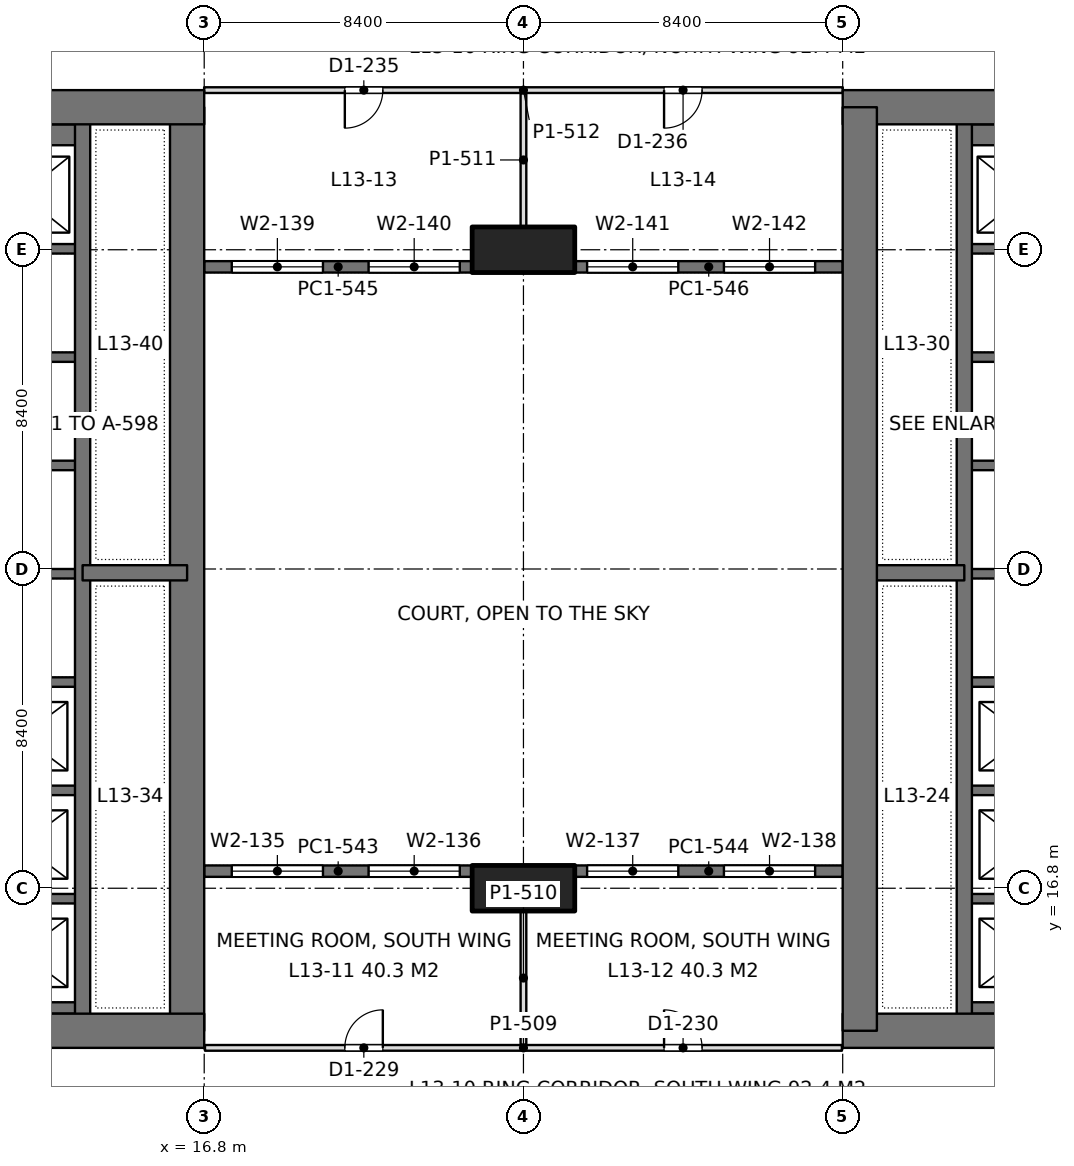
"""IFC4 building model, lengths in metres.
Left out: names, types, materials, properties, quantities, classifications, styles, units other than length and angle.
Written with IfcOpenShell. Run it as: python <this file> out.ifc"""

import sys

from ifc_helpers import new_model, si_unit, direction, frame, frame_2d, origin, origin_2d, place, context, subcontext, project, spatial, rectangle, extrude, element, fill, save


model = new_model("IFC4")
c1 = context("Model", 3, precision=1e-05, world=origin(), true_north=direction((0.0, 1.0)))
c2 = subcontext(c1, "Body", "Model", "MODEL_VIEW")
j1 = project(units=[si_unit("LENGTHUNIT", "METRE"), si_unit("PLANEANGLEUNIT", "RADIAN")], contexts=[c1])
p1 = place(None, origin())
s1 = spatial("IfcSite", under=j1, at=p1, CompositionType="ELEMENT")
p2 = place(p1, origin())
s2 = spatial("IfcBuilding", under=s1, at=p2, CompositionType="ELEMENT")
p3 = place(p2, frame((0.0, 0.0, 59.4)))
s3 = spatial("IfcBuildingStorey", under=s2, at=p3, CompositionType="ELEMENT", Elevation=59.4)
for number, where, z_axis, x_axis in (
    (1, (25.2, 16.8, 0.0), (0.0, 0.0, 1.0), (1.0, 0.0, 0.0)),
    (2, (25.2, 33.6, 0.0), (0.0, 0.0, 1.0), (1.0, 0.0, 0.0)),
):
    element("IfcColumn", number, at=place(p3, frame(where, z_axis=z_axis, x_axis=x_axis)), inside=s3, PredefinedType="COLUMN", context=c2, shape_type="SweptSolid", body=[
        extrude(rectangle(XDim=2.7, YDim=1.2, at=origin_2d()), origin(), (0.0, 0.0, 1.0), 4.5),
    ])
p4 = place(p3, frame((-1.2, 13.05, 0.0), z_axis=(0.0, 0.0, 1.0), x_axis=(1.0, 0.0, 0.0)))
e3 = element("IfcWall", 3, at=p4, inside=s3, PredefinedType="SHEAR", context=c2, shape_type="SweptSolid", body=[
    extrude(rectangle(XDim=18.0, YDim=0.9, at=frame_2d((9.0, 0.0))), origin(), (0.0, 0.0, 1.0), 4.5),
])
p5 = place(p4, frame((8.95, 0.0, 0.0)))
e4 = element("IfcOpeningElement", 4, at=p5, cuts=e3, PredefinedType="OPENING", context=c2, shape_type="SweptSolid", body=[
    extrude(rectangle(XDim=1.8, YDim=2.4, at=frame_2d((0.9, 1.2))), frame((0.0, 0.46, 0.0), z_axis=(0.0, -1.0, 0.0), x_axis=(1.0, 0.0, 0.0)), (0.0, 0.0, 1.0), 0.92),
])
p6 = place(p3, frame((-1.2, 37.35, 0.0), z_axis=(0.0, 0.0, 1.0), x_axis=(1.0, 0.0, 0.0)))
e5 = element("IfcWall", 5, at=p6, inside=s3, PredefinedType="SHEAR", context=c2, shape_type="SweptSolid", body=[
    extrude(rectangle(XDim=18.0, YDim=0.9, at=frame_2d((9.0, 0.0))), origin(), (0.0, 0.0, 1.0), 4.5),
])
p7 = place(p6, frame((8.95, 0.0, 0.0)))
e6 = element("IfcOpeningElement", 6, at=p7, cuts=e5, PredefinedType="OPENING", context=c2, shape_type="SweptSolid", body=[
    extrude(rectangle(XDim=1.8, YDim=2.4, at=frame_2d((0.9, 1.2))), frame((0.0, 0.46, 0.0), z_axis=(0.0, -1.0, 0.0), x_axis=(1.0, 0.0, 0.0)), (0.0, 0.0, 1.0), 0.92),
])
p8 = place(p3, frame((16.35, 13.05, 0.0), z_axis=(0.0, 0.0, 1.0), x_axis=(0.0, 1.0, 0.0)))
e7 = element("IfcWall", 7, at=p8, inside=s3, PredefinedType="SHEAR", context=c2, shape_type="SweptSolid", body=[
    extrude(rectangle(XDim=24.3, YDim=0.9, at=frame_2d((12.15, 0.0))), origin(), (0.0, 0.0, 1.0), 4.5),
])
p9 = place(p3, frame((13.6, 13.05, 0.0), z_axis=(0.0, 0.0, 1.0), x_axis=(0.0, 1.0, 0.0)))
e8 = element("IfcWall", 8, at=p9, inside=s3, PredefinedType="SHEAR", context=c2, shape_type="SweptSolid", body=[
    extrude(rectangle(XDim=24.3, YDim=0.4, at=frame_2d((12.15, 0.0))), origin(), (0.0, 0.0, 1.0), 4.5),
])
p10 = place(p3, frame((13.6, 25.1, 0.0), z_axis=(0.0, 0.0, 1.0), x_axis=(1.0, 0.0, 0.0)))
e9 = element("IfcWall", 9, at=p10, inside=s3, PredefinedType="SHEAR", context=c2, shape_type="SweptSolid", body=[
    extrude(rectangle(XDim=2.75, YDim=0.4, at=frame_2d((1.375, 0.0))), origin(), (0.0, 0.0, 1.0), 4.5),
])
p11 = place(p3, frame((10.4, 13.65, 0.0), z_axis=(0.0, 0.0, 1.0), x_axis=(1.0, 0.0, 0.0)))
e10 = element("IfcWall", 10, at=p11, inside=s3, PredefinedType="SHEAR", context=c2, shape_type="SweptSolid", body=[
    extrude(rectangle(XDim=3.2, YDim=0.3, at=frame_2d((1.6, 0.0))), origin(), (0.0, 0.0, 1.0), 4.5),
])
for number, where, z_axis, x_axis in (
    (11, (10.4, 16.525, 0.0), (0.0, 0.0, 1.0), (1.0, 0.0, 0.0)),
    (12, (10.4, 19.375, 0.0), (0.0, 0.0, 1.0), (1.0, 0.0, 0.0)),
    (13, (10.4, 22.225, 0.0), (0.0, 0.0, 1.0), (1.0, 0.0, 0.0)),
    (14, (10.4, 25.075, 0.0), (0.0, 0.0, 1.0), (1.0, 0.0, 0.0)),
    (15, (10.4, 27.925, 0.0), (0.0, 0.0, 1.0), (1.0, 0.0, 0.0)),
    (16, (10.4, 30.775, 0.0), (0.0, 0.0, 1.0), (1.0, 0.0, 0.0)),
    (17, (10.4, 33.625, 0.0), (0.0, 0.0, 1.0), (1.0, 0.0, 0.0)),
):
    element("IfcWall", number, at=place(p3, frame(where, z_axis=z_axis, x_axis=x_axis)), inside=s3, PredefinedType="SHEAR", context=c2, shape_type="SweptSolid", body=[
        extrude(rectangle(XDim=3.2, YDim=0.25, at=frame_2d((1.6, 0.0))), origin(), (0.0, 0.0, 1.0), 4.5),
    ])
p12 = place(p3, frame((10.4, 36.625, 0.0), z_axis=(0.0, 0.0, 1.0), x_axis=(1.0, 0.0, 0.0)))
e18 = element("IfcWall", 18, at=p12, inside=s3, PredefinedType="SHEAR", context=c2, shape_type="SweptSolid", body=[
    extrude(rectangle(XDim=3.2, YDim=0.55, at=frame_2d((1.6, 0.0))), origin(), (0.0, 0.0, 1.0), 4.5),
])
p13 = place(p3, frame((33.6, 13.05, 0.0), z_axis=(0.0, 0.0, 1.0), x_axis=(1.0, 0.0, 0.0)))
e19 = element("IfcWall", 19, at=p13, inside=s3, PredefinedType="SHEAR", context=c2, shape_type="SweptSolid", body=[
    extrude(rectangle(XDim=18.0, YDim=0.9, at=frame_2d((9.0, 0.0))), origin(), (0.0, 0.0, 1.0), 4.5),
])
p14 = place(p13, frame((7.25, 0.0, 0.0)))
e20 = element("IfcOpeningElement", 20, at=p14, cuts=e19, PredefinedType="OPENING", context=c2, shape_type="SweptSolid", body=[
    extrude(rectangle(XDim=1.8, YDim=2.4, at=frame_2d((0.9, 1.2))), frame((0.0, 0.46, 0.0), z_axis=(0.0, -1.0, 0.0), x_axis=(1.0, 0.0, 0.0)), (0.0, 0.0, 1.0), 0.92),
])
p15 = place(p3, frame((33.6, 37.35, 0.0), z_axis=(0.0, 0.0, 1.0), x_axis=(1.0, 0.0, 0.0)))
e21 = element("IfcWall", 21, at=p15, inside=s3, PredefinedType="SHEAR", context=c2, shape_type="SweptSolid", body=[
    extrude(rectangle(XDim=18.0, YDim=0.9, at=frame_2d((9.0, 0.0))), origin(), (0.0, 0.0, 1.0), 4.5),
])
p16 = place(p15, frame((7.25, 0.0, 0.0)))
e22 = element("IfcOpeningElement", 22, at=p16, cuts=e21, PredefinedType="OPENING", context=c2, shape_type="SweptSolid", body=[
    extrude(rectangle(XDim=1.8, YDim=2.4, at=frame_2d((0.9, 1.2))), frame((0.0, 0.46, 0.0), z_axis=(0.0, -1.0, 0.0), x_axis=(1.0, 0.0, 0.0)), (0.0, 0.0, 1.0), 0.92),
])
p17 = place(p3, frame((34.05, 13.05, 0.0), z_axis=(0.0, 0.0, 1.0), x_axis=(0.0, 1.0, 0.0)))
e23 = element("IfcWall", 23, at=p17, inside=s3, PredefinedType="SHEAR", context=c2, shape_type="SweptSolid", body=[
    extrude(rectangle(XDim=24.3, YDim=0.9, at=frame_2d((12.15, 0.0))), origin(), (0.0, 0.0, 1.0), 4.5),
])
p18 = place(p3, frame((36.8, 13.05, 0.0), z_axis=(0.0, 0.0, 1.0), x_axis=(0.0, 1.0, 0.0)))
e24 = element("IfcWall", 24, at=p18, inside=s3, PredefinedType="SHEAR", context=c2, shape_type="SweptSolid", body=[
    extrude(rectangle(XDim=24.3, YDim=0.4, at=frame_2d((12.15, 0.0))), origin(), (0.0, 0.0, 1.0), 4.5),
])
p19 = place(p3, frame((36.8, 25.1, 0.0), z_axis=(0.0, 0.0, 1.0), x_axis=(-1.0, 0.0, 0.0)))
e25 = element("IfcWall", 25, at=p19, inside=s3, PredefinedType="SHEAR", context=c2, shape_type="SweptSolid", body=[
    extrude(rectangle(XDim=2.75, YDim=0.4, at=frame_2d((1.375, 0.0))), origin(), (0.0, 0.0, 1.0), 4.5),
])
p20 = place(p3, frame((40.0, 13.65, 0.0), z_axis=(0.0, 0.0, 1.0), x_axis=(-1.0, 0.0, 0.0)))
e26 = element("IfcWall", 26, at=p20, inside=s3, PredefinedType="SHEAR", context=c2, shape_type="SweptSolid", body=[
    extrude(rectangle(XDim=3.2, YDim=0.3, at=frame_2d((1.6, 0.0))), origin(), (0.0, 0.0, 1.0), 4.5),
])
for number, where, z_axis, x_axis in (
    (27, (40.0, 16.525, 0.0), (0.0, 0.0, 1.0), (-1.0, 0.0, 0.0)),
    (28, (40.0, 19.375, 0.0), (0.0, 0.0, 1.0), (-1.0, 0.0, 0.0)),
    (29, (40.0, 22.225, 0.0), (0.0, 0.0, 1.0), (-1.0, 0.0, 0.0)),
    (30, (40.0, 25.075, 0.0), (0.0, 0.0, 1.0), (-1.0, 0.0, 0.0)),
    (31, (40.0, 27.925, 0.0), (0.0, 0.0, 1.0), (-1.0, 0.0, 0.0)),
    (32, (40.0, 30.775, 0.0), (0.0, 0.0, 1.0), (-1.0, 0.0, 0.0)),
    (33, (40.0, 33.625, 0.0), (0.0, 0.0, 1.0), (-1.0, 0.0, 0.0)),
):
    element("IfcWall", number, at=place(p3, frame(where, z_axis=z_axis, x_axis=x_axis)), inside=s3, PredefinedType="SHEAR", context=c2, shape_type="SweptSolid", body=[
        extrude(rectangle(XDim=3.2, YDim=0.25, at=frame_2d((1.6, 0.0))), origin(), (0.0, 0.0, 1.0), 4.5),
    ])
p21 = place(p3, frame((40.0, 36.625, 0.0), z_axis=(0.0, 0.0, 1.0), x_axis=(-1.0, 0.0, 0.0)))
e34 = element("IfcWall", 34, at=p21, inside=s3, PredefinedType="SHEAR", context=c2, shape_type="SweptSolid", body=[
    extrude(rectangle(XDim=3.2, YDim=0.55, at=frame_2d((1.6, 0.0))), origin(), (0.0, 0.0, 1.0), 4.5),
])
p22 = place(p3, frame((16.8, 17.25, 0.0), z_axis=(0.0, 0.0, 1.0), x_axis=(1.0, 0.0, 0.0)))
e35 = element("IfcWall", 35, at=p22, inside=s3, PredefinedType="SOLIDWALL", context=c2, shape_type="SweptSolid", body=[
    extrude(rectangle(XDim=7.05, YDim=0.3, at=frame_2d((3.525, 0.0))), origin(), (0.0, 0.0, 1.0), 4.34),
])
p23 = place(p22, frame((0.725, 0.0, 0.9)))
e36 = element("IfcOpeningElement", 36, at=p23, cuts=e35, PredefinedType="OPENING", context=c2, shape_type="SweptSolid", body=[
    extrude(rectangle(XDim=2.4, YDim=1.9, at=frame_2d((1.2, 0.95))), frame((0.0, 0.16, 0.0), z_axis=(0.0, -1.0, 0.0), x_axis=(1.0, 0.0, 0.0)), (0.0, 0.0, 1.0), 0.32),
])
p24 = place(p22, frame((4.325, 0.0, 0.9)))
e37 = element("IfcOpeningElement", 37, at=p24, cuts=e35, PredefinedType="OPENING", context=c2, shape_type="SweptSolid", body=[
    extrude(rectangle(XDim=2.4, YDim=1.9, at=frame_2d((1.2, 0.95))), frame((0.0, 0.16, 0.0), z_axis=(0.0, -1.0, 0.0), x_axis=(1.0, 0.0, 0.0)), (0.0, 0.0, 1.0), 0.32),
])
p25 = place(p3, frame((26.55, 17.25, 0.0), z_axis=(0.0, 0.0, 1.0), x_axis=(1.0, 0.0, 0.0)))
e38 = element("IfcWall", 38, at=p25, inside=s3, PredefinedType="SOLIDWALL", context=c2, shape_type="SweptSolid", body=[
    extrude(rectangle(XDim=7.05, YDim=0.3, at=frame_2d((3.525, 0.0))), origin(), (0.0, 0.0, 1.0), 4.34),
])
p26 = place(p25, frame((0.325, 0.0, 0.9)))
e39 = element("IfcOpeningElement", 39, at=p26, cuts=e38, PredefinedType="OPENING", context=c2, shape_type="SweptSolid", body=[
    extrude(rectangle(XDim=2.4, YDim=1.9, at=frame_2d((1.2, 0.95))), frame((0.0, 0.16, 0.0), z_axis=(0.0, -1.0, 0.0), x_axis=(1.0, 0.0, 0.0)), (0.0, 0.0, 1.0), 0.32),
])
p27 = place(p25, frame((3.925, 0.0, 0.9)))
e40 = element("IfcOpeningElement", 40, at=p27, cuts=e38, PredefinedType="OPENING", context=c2, shape_type="SweptSolid", body=[
    extrude(rectangle(XDim=2.4, YDim=1.9, at=frame_2d((1.2, 0.95))), frame((0.0, 0.16, 0.0), z_axis=(0.0, -1.0, 0.0), x_axis=(1.0, 0.0, 0.0)), (0.0, 0.0, 1.0), 0.32),
])
p28 = place(p3, frame((16.8, 33.15, 0.0), z_axis=(0.0, 0.0, 1.0), x_axis=(1.0, 0.0, 0.0)))
e41 = element("IfcWall", 41, at=p28, inside=s3, PredefinedType="SOLIDWALL", context=c2, shape_type="SweptSolid", body=[
    extrude(rectangle(XDim=7.05, YDim=0.3, at=frame_2d((3.525, 0.0))), origin(), (0.0, 0.0, 1.0), 4.34),
])
p29 = place(p28, frame((0.725, 0.0, 0.9)))
e42 = element("IfcOpeningElement", 42, at=p29, cuts=e41, PredefinedType="OPENING", context=c2, shape_type="SweptSolid", body=[
    extrude(rectangle(XDim=2.4, YDim=1.9, at=frame_2d((1.2, 0.95))), frame((0.0, 0.16, 0.0), z_axis=(0.0, -1.0, 0.0), x_axis=(1.0, 0.0, 0.0)), (0.0, 0.0, 1.0), 0.32),
])
p30 = place(p28, frame((4.325, 0.0, 0.9)))
e43 = element("IfcOpeningElement", 43, at=p30, cuts=e41, PredefinedType="OPENING", context=c2, shape_type="SweptSolid", body=[
    extrude(rectangle(XDim=2.4, YDim=1.9, at=frame_2d((1.2, 0.95))), frame((0.0, 0.16, 0.0), z_axis=(0.0, -1.0, 0.0), x_axis=(1.0, 0.0, 0.0)), (0.0, 0.0, 1.0), 0.32),
])
p31 = place(p3, frame((26.55, 33.15, 0.0), z_axis=(0.0, 0.0, 1.0), x_axis=(1.0, 0.0, 0.0)))
e44 = element("IfcWall", 44, at=p31, inside=s3, PredefinedType="SOLIDWALL", context=c2, shape_type="SweptSolid", body=[
    extrude(rectangle(XDim=7.05, YDim=0.3, at=frame_2d((3.525, 0.0))), origin(), (0.0, 0.0, 1.0), 4.34),
])
p32 = place(p31, frame((0.325, 0.0, 0.9)))
e45 = element("IfcOpeningElement", 45, at=p32, cuts=e44, PredefinedType="OPENING", context=c2, shape_type="SweptSolid", body=[
    extrude(rectangle(XDim=2.4, YDim=1.9, at=frame_2d((1.2, 0.95))), frame((0.0, 0.16, 0.0), z_axis=(0.0, -1.0, 0.0), x_axis=(1.0, 0.0, 0.0)), (0.0, 0.0, 1.0), 0.32),
])
p33 = place(p31, frame((3.925, 0.0, 0.9)))
e46 = element("IfcOpeningElement", 46, at=p33, cuts=e44, PredefinedType="OPENING", context=c2, shape_type="SweptSolid", body=[
    extrude(rectangle(XDim=2.4, YDim=1.9, at=frame_2d((1.2, 0.95))), frame((0.0, 0.16, 0.0), z_axis=(0.0, -1.0, 0.0), x_axis=(1.0, 0.0, 0.0)), (0.0, 0.0, 1.0), 0.32),
])
p34 = place(p3, frame((25.2, 12.674, 0.0), z_axis=(0.0, 0.0, 1.0), x_axis=(0.0, 1.0, 0.0)))
e47 = element("IfcWall", 47, at=p34, inside=s3, PredefinedType="PARTITIONING", context=c2, shape_type="SweptSolid", body=[
    extrude(rectangle(XDim=3.527, YDim=0.15, at=frame_2d((1.763, 0.0))), origin(), (0.0, 0.0, 1.0), 3.74),
])
p35 = place(p3, frame((16.82, 12.6, 0.0), z_axis=(0.0, 0.0, 1.0), x_axis=(1.0, 0.0, 0.0)))
e48 = element("IfcWall", 48, at=p35, inside=s3, PredefinedType="PARTITIONING", context=c2, shape_type="SweptSolid", body=[
    extrude(rectangle(XDim=16.76, YDim=0.15, at=frame_2d((8.38, 0.0))), origin(), (0.0, 0.0, 1.0), 3.74),
])
p36 = place(p35, frame((3.68, 0.0, 0.0)))
e49 = element("IfcOpeningElement", 49, at=p36, cuts=e48, PredefinedType="OPENING", context=c2, shape_type="SweptSolid", body=[
    extrude(rectangle(XDim=1.0, YDim=2.2, at=frame_2d((0.5, 1.1))), frame((0.0, 0.085, 0.0), z_axis=(0.0, -1.0, 0.0), x_axis=(1.0, 0.0, 0.0)), (0.0, 0.0, 1.0), 0.17),
])
p37 = place(p35, frame((12.08, 0.0, 0.0)))
e50 = element("IfcOpeningElement", 50, at=p37, cuts=e48, PredefinedType="OPENING", context=c2, shape_type="SweptSolid", body=[
    extrude(rectangle(XDim=1.0, YDim=2.2, at=frame_2d((0.5, 1.1))), frame((0.0, 0.085, 0.0), z_axis=(0.0, -1.0, 0.0), x_axis=(1.0, 0.0, 0.0)), (0.0, 0.0, 1.0), 0.17),
])
p38 = place(p3, frame((25.2, 34.199, 0.0), z_axis=(0.0, 0.0, 1.0), x_axis=(0.0, 1.0, 0.0)))
e51 = element("IfcWall", 51, at=p38, inside=s3, PredefinedType="PARTITIONING", context=c2, shape_type="SweptSolid", body=[
    extrude(rectangle(XDim=3.527, YDim=0.15, at=frame_2d((1.764, 0.0))), origin(), (0.0, 0.0, 1.0), 3.74),
])
p39 = place(p3, frame((16.798, 37.8, 0.0), z_axis=(0.0, 0.0, 1.0), x_axis=(1.0, 0.0, 0.0)))
e52 = element("IfcWall", 52, at=p39, inside=s3, PredefinedType="PARTITIONING", context=c2, shape_type="SweptSolid", body=[
    extrude(rectangle(XDim=16.804, YDim=0.15, at=frame_2d((8.402, 0.0))), origin(), (0.0, 0.0, 1.0), 3.74),
])
p40 = place(p39, frame((3.702, 0.0, 0.0)))
e53 = element("IfcOpeningElement", 53, at=p40, cuts=e52, PredefinedType="OPENING", context=c2, shape_type="SweptSolid", body=[
    extrude(rectangle(XDim=1.0, YDim=2.2, at=frame_2d((0.5, 1.1))), frame((0.0, 0.085, 0.0), z_axis=(0.0, -1.0, 0.0), x_axis=(1.0, 0.0, 0.0)), (0.0, 0.0, 1.0), 0.17),
])
p41 = place(p39, frame((12.102, 0.0, 0.0)))
e54 = element("IfcOpeningElement", 54, at=p41, cuts=e52, PredefinedType="OPENING", context=c2, shape_type="SweptSolid", body=[
    extrude(rectangle(XDim=1.0, YDim=2.2, at=frame_2d((0.5, 1.1))), frame((0.0, 0.085, 0.0), z_axis=(0.0, -1.0, 0.0), x_axis=(1.0, 0.0, 0.0)), (0.0, 0.0, 1.0), 0.17),
])
p42 = place(p23, origin())
e55 = element("IfcWindow", 55, at=p42, inside=s3, PartitioningType="SINGLE_PANEL", PredefinedType="WINDOW", context=c2, shape_type="SweptSolid", body=[
    extrude(rectangle(XDim=2.4, YDim=1.9, at=frame_2d((1.2, 0.95))), frame((0.0, 0.03, 0.0), z_axis=(0.0, -1.0, 0.0), x_axis=(1.0, 0.0, 0.0)), (0.0, 0.0, 1.0), 0.06),
])
fill(e36, e55)
p43 = place(p24, origin())
e56 = element("IfcWindow", 56, at=p43, inside=s3, PartitioningType="SINGLE_PANEL", PredefinedType="WINDOW", context=c2, shape_type="SweptSolid", body=[
    extrude(rectangle(XDim=2.4, YDim=1.9, at=frame_2d((1.2, 0.95))), frame((0.0, 0.03, 0.0), z_axis=(0.0, -1.0, 0.0), x_axis=(1.0, 0.0, 0.0)), (0.0, 0.0, 1.0), 0.06),
])
fill(e37, e56)
p44 = place(p26, origin())
e57 = element("IfcWindow", 57, at=p44, inside=s3, PartitioningType="SINGLE_PANEL", PredefinedType="WINDOW", context=c2, shape_type="SweptSolid", body=[
    extrude(rectangle(XDim=2.4, YDim=1.9, at=frame_2d((1.2, 0.95))), frame((0.0, 0.03, 0.0), z_axis=(0.0, -1.0, 0.0), x_axis=(1.0, 0.0, 0.0)), (0.0, 0.0, 1.0), 0.06),
])
fill(e39, e57)
p45 = place(p27, origin())
e58 = element("IfcWindow", 58, at=p45, inside=s3, PartitioningType="SINGLE_PANEL", PredefinedType="WINDOW", context=c2, shape_type="SweptSolid", body=[
    extrude(rectangle(XDim=2.4, YDim=1.9, at=frame_2d((1.2, 0.95))), frame((0.0, 0.03, 0.0), z_axis=(0.0, -1.0, 0.0), x_axis=(1.0, 0.0, 0.0)), (0.0, 0.0, 1.0), 0.06),
])
fill(e40, e58)
p46 = place(p29, origin())
e59 = element("IfcWindow", 59, at=p46, inside=s3, PartitioningType="SINGLE_PANEL", PredefinedType="WINDOW", context=c2, shape_type="SweptSolid", body=[
    extrude(rectangle(XDim=2.4, YDim=1.9, at=frame_2d((1.2, 0.95))), frame((0.0, 0.03, 0.0), z_axis=(0.0, -1.0, 0.0), x_axis=(1.0, 0.0, 0.0)), (0.0, 0.0, 1.0), 0.06),
])
fill(e42, e59)
p47 = place(p30, origin())
e60 = element("IfcWindow", 60, at=p47, inside=s3, PartitioningType="SINGLE_PANEL", PredefinedType="WINDOW", context=c2, shape_type="SweptSolid", body=[
    extrude(rectangle(XDim=2.4, YDim=1.9, at=frame_2d((1.2, 0.95))), frame((0.0, 0.03, 0.0), z_axis=(0.0, -1.0, 0.0), x_axis=(1.0, 0.0, 0.0)), (0.0, 0.0, 1.0), 0.06),
])
fill(e43, e60)
p48 = place(p32, origin())
e61 = element("IfcWindow", 61, at=p48, inside=s3, PartitioningType="SINGLE_PANEL", PredefinedType="WINDOW", context=c2, shape_type="SweptSolid", body=[
    extrude(rectangle(XDim=2.4, YDim=1.9, at=frame_2d((1.2, 0.95))), frame((0.0, 0.03, 0.0), z_axis=(0.0, -1.0, 0.0), x_axis=(1.0, 0.0, 0.0)), (0.0, 0.0, 1.0), 0.06),
])
fill(e45, e61)
p49 = place(p33, origin())
e62 = element("IfcWindow", 62, at=p49, inside=s3, PartitioningType="SINGLE_PANEL", PredefinedType="WINDOW", context=c2, shape_type="SweptSolid", body=[
    extrude(rectangle(XDim=2.4, YDim=1.9, at=frame_2d((1.2, 0.95))), frame((0.0, 0.03, 0.0), z_axis=(0.0, -1.0, 0.0), x_axis=(1.0, 0.0, 0.0)), (0.0, 0.0, 1.0), 0.06),
])
fill(e46, e62)
p50 = place(p36, origin())
e63 = element("IfcDoor", 63, at=p50, inside=s3, OperationType="SINGLE_SWING_RIGHT", PredefinedType="DOOR", context=c2, shape_type="SweptSolid", body=[
    extrude(rectangle(XDim=1.0, YDim=2.2, at=frame_2d((0.5, 1.1))), frame((0.0, 0.025, 0.0), z_axis=(0.0, -1.0, 0.0), x_axis=(1.0, 0.0, 0.0)), (0.0, 0.0, 1.0), 0.05),
])
fill(e49, e63)
p51 = place(p37, origin())
e64 = element("IfcDoor", 64, at=p51, inside=s3, OperationType="SINGLE_SWING_LEFT", PredefinedType="DOOR", context=c2, shape_type="SweptSolid", body=[
    extrude(rectangle(XDim=1.0, YDim=2.2, at=frame_2d((0.5, 1.1))), frame((0.0, 0.025, 0.0), z_axis=(0.0, -1.0, 0.0), x_axis=(1.0, 0.0, 0.0)), (0.0, 0.0, 1.0), 0.05),
])
fill(e50, e64)
p52 = place(p40, frame((1.0, 0.0, 0.0), z_axis=(0.0, 0.0, 1.0), x_axis=(-1.0, 0.0, 0.0)))
e65 = element("IfcDoor", 65, at=p52, inside=s3, OperationType="SINGLE_SWING_RIGHT", PredefinedType="DOOR", context=c2, shape_type="SweptSolid", body=[
    extrude(rectangle(XDim=1.0, YDim=2.2, at=frame_2d((0.5, 1.1))), frame((0.0, 0.025, 0.0), z_axis=(0.0, -1.0, 0.0), x_axis=(1.0, 0.0, 0.0)), (0.0, 0.0, 1.0), 0.05),
])
fill(e53, e65)
p53 = place(p41, frame((1.0, 0.0, 0.0), z_axis=(0.0, 0.0, 1.0), x_axis=(-1.0, 0.0, 0.0)))
e66 = element("IfcDoor", 66, at=p53, inside=s3, OperationType="SINGLE_SWING_RIGHT", PredefinedType="DOOR", context=c2, shape_type="SweptSolid", body=[
    extrude(rectangle(XDim=1.0, YDim=2.2, at=frame_2d((0.5, 1.1))), frame((0.0, 0.025, 0.0), z_axis=(0.0, -1.0, 0.0), x_axis=(1.0, 0.0, 0.0)), (0.0, 0.0, 1.0), 0.05),
])
fill(e54, e66)
save(model, sys.argv[1])
